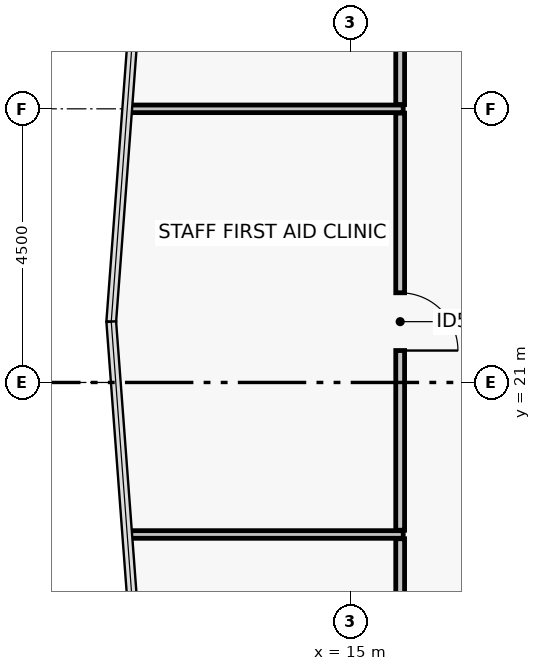
"""IFC4 building model, lengths in metres.
Left out: names, types, materials, properties, quantities, classifications, styles, units other than length and angle.
Written with IfcOpenShell. Run it as: python <this file> out.ifc"""

import sys

from ifc_helpers import new_model, si_unit, direction, frame, frame_2d, origin, place, context, subcontext, project, spatial, rectangle, extrude, element, fill, save


model = new_model("IFC4")
c1 = context("Model", 3, precision=1e-05, world=origin(), true_north=direction((0.0, 1.0)))
c2 = subcontext(c1, "Body", "Model", "MODEL_VIEW")
j1 = project(units=[si_unit("LENGTHUNIT", "METRE"), si_unit("PLANEANGLEUNIT", "RADIAN")], contexts=[c1])
p1 = place(None, origin())
s1 = spatial("IfcSite", under=j1, at=p1, CompositionType="ELEMENT")
p2 = place(p1, origin())
s2 = spatial("IfcBuilding", under=s1, at=p2, CompositionType="ELEMENT")
p3 = place(p2, frame((0.0, 0.0, 89.1)))
s3 = spatial("IfcBuildingStorey", under=s2, at=p3, CompositionType="ELEMENT", Elevation=89.1)
p4 = place(p3, frame((15.82, 18.43, 0.0), z_axis=(0.0, 0.0, 1.0), x_axis=(0.0, -1.0, 0.0)))
e1 = element("IfcWall", 1, at=p4, inside=s3, PredefinedType="PARTITIONING", context=c2, shape_type="SweptSolid", body=[
    extrude(rectangle(XDim=5.14, YDim=0.145, at=frame_2d((2.57, 0.0))), origin(), (0.0, 0.0, 1.0), 2.65),
])
p5 = place(p3, frame((15.82, 28.7, 0.0), z_axis=(0.0, 0.0, 1.0), x_axis=(0.0, -1.0, 0.0)))
e2 = element("IfcWall", 2, at=p5, inside=s3, PredefinedType="PARTITIONING", context=c2, shape_type="SweptSolid", body=[
    extrude(rectangle(XDim=3.13, YDim=0.145, at=frame_2d((1.565, 0.0))), origin(), (0.0, 0.0, 1.0), 2.65),
])
p6 = place(p3, frame((15.82, 25.43, 0.0), z_axis=(0.0, 0.0, 1.0), x_axis=(0.0, -1.0, 0.0)))
e3 = element("IfcWall", 3, at=p6, inside=s3, PredefinedType="PARTITIONING", context=c2, shape_type="SweptSolid", body=[
    extrude(rectangle(XDim=6.86, YDim=0.145, at=frame_2d((3.43, 0.0))), origin(), (0.0, 0.0, 1.0), 3.05),
])
p7 = place(p6, frame((2.955, 0.0, 0.0)))
e4 = element("IfcOpeningElement", 4, at=p7, cuts=e3, PredefinedType="OPENING", context=c2, shape_type="SweptSolid", body=[
    extrude(rectangle(XDim=0.95, YDim=2.06, at=frame_2d((0.475, 1.03))), frame((0.0, 0.083, 0.0), z_axis=(0.0, -1.0, 0.0), x_axis=(1.0, 0.0, 0.0)), (0.0, 0.0, 1.0), 0.165),
])
for number, where, z_axis, x_axis in (
    (5, (11.321, 18.5, 0.0), (0.0, 0.0, 1.0), (1.0, 0.0, 0.0)),
    (6, (11.321, 25.5, 0.0), (0.0, 0.0, 1.0), (1.0, 0.0, 0.0)),
):
    element("IfcWall", number, at=place(p3, frame(where, z_axis=z_axis, x_axis=x_axis)), inside=s3, PredefinedType="PARTITIONING", context=c2, shape_type="SweptSolid", body=[
        extrude(rectangle(XDim=4.549, YDim=0.125, at=frame_2d((2.275, 0.0))), origin(), (0.0, 0.0, 1.0), 2.85),
    ])
p8 = place(p7, origin())
e7 = element("IfcDoor", 7, at=p8, inside=s3, OperationType="SINGLE_SWING_RIGHT", PredefinedType="DOOR", context=c2, shape_type="SweptSolid", body=[
    extrude(rectangle(XDim=0.95, YDim=2.06, at=frame_2d((0.475, 1.03))), frame((0.0, 0.025, 0.0), z_axis=(0.0, -1.0, 0.0), x_axis=(1.0, 0.0, 0.0)), (0.0, 0.0, 1.0), 0.05),
])
fill(e4, e7)
save(model, sys.argv[1])
